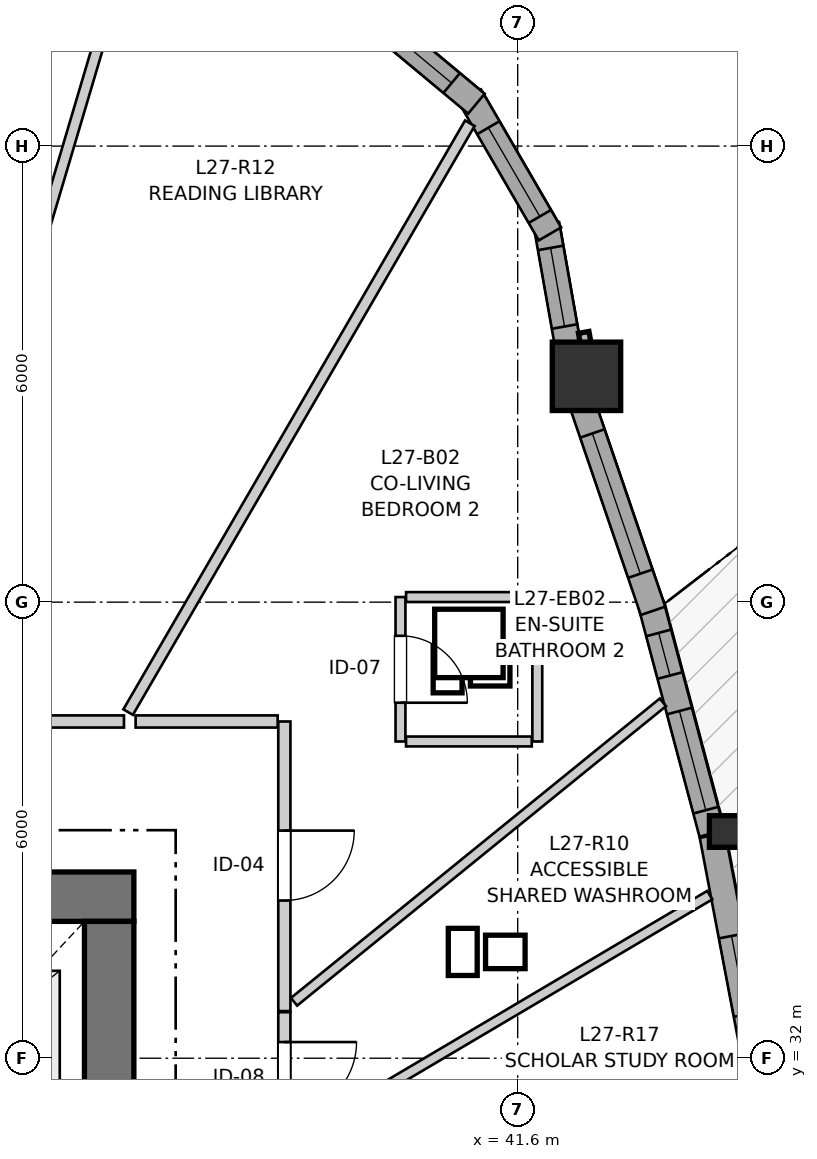
"""IFC4 building model, lengths in metres.
Left out: names, types, materials, properties, quantities, classifications, styles, units other than length and angle.
Written with IfcOpenShell. Run it as: python <this file> out.ifc"""

import sys

from ifc_helpers import new_model, si_unit, direction, frame, frame_2d, origin, origin_2d, place, context, subcontext, project, spatial, rectangle, i_section, extrude, source, transform, mapped, element, fill, save


model = new_model("IFC4")
c1 = context("Model", 3, precision=1e-05, world=origin(), true_north=direction((0.0, 1.0)))
c2 = subcontext(c1, "Body", "Model", "MODEL_VIEW")
j1 = project(units=[si_unit("LENGTHUNIT", "METRE"), si_unit("PLANEANGLEUNIT", "RADIAN")], contexts=[c1])
p1 = place(None, origin())
s1 = spatial("IfcSite", under=j1, at=p1, CompositionType="ELEMENT")
p2 = place(p1, origin())
s2 = spatial("IfcBuilding", under=s1, at=p2, CompositionType="ELEMENT")
p3 = place(p2, frame((0.0, 0.0, 92.8)))
s3 = spatial("IfcBuildingStorey", under=s2, at=p3, CompositionType="ELEMENT", Elevation=92.8)
p4 = place(p3, frame((36.55, 34.125, 0.0), z_axis=(0.0, 0.0, 1.0), x_axis=(-1.0, 0.0, 0.0)))
e1 = element("IfcWall", 1, at=p4, inside=s3, PredefinedType="SHEAR", context=c2, shape_type="SweptSolid", body=[
    extrude(rectangle(XDim=12.4, YDim=0.65, at=frame_2d((6.2, 0.0))), origin(), (0.0, 0.0, 1.0), 2.95),
])
p5 = place(p3, frame((36.225, 18.2, 0.0), z_axis=(0.0, 0.0, 1.0), x_axis=(0.0, 1.0, 0.0)))
e2 = element("IfcWall", 2, at=p5, inside=s3, PredefinedType="SHEAR", context=c2, shape_type="SweptSolid", body=[
    extrude(rectangle(XDim=15.6, YDim=0.65, at=frame_2d((7.8, 0.0))), origin(), (0.0, 0.0, 1.0), 2.95),
])
p6 = place(p5, frame((4.25, 0.0, 0.0)))
e3 = element("IfcOpeningElement", 3, at=p6, cuts=e2, PredefinedType="OPENING", context=c2, shape_type="SweptSolid", body=[
    extrude(rectangle(XDim=1.1, YDim=2.15, at=frame_2d((0.55, 1.075))), frame((0.0, 0.335, 0.0), z_axis=(0.0, -1.0, 0.0), x_axis=(1.0, 0.0, 0.0)), (0.0, 0.0, 1.0), 0.67),
])
p7 = place(p5, frame((10.25, 0.0, 0.0)))
e4 = element("IfcOpeningElement", 4, at=p7, cuts=e2, PredefinedType="OPENING", context=c2, shape_type="SweptSolid", body=[
    extrude(rectangle(XDim=1.1, YDim=2.15, at=frame_2d((0.55, 1.075))), frame((0.0, 0.335, 0.0), z_axis=(0.0, -1.0, 0.0), x_axis=(1.0, 0.0, 0.0)), (0.0, 0.0, 1.0), 0.67),
])
m1 = source(origin(), c2, "Body", "SweptSolid", [
    extrude(i_section(OverallWidth=0.406, OverallDepth=0.416, WebThickness=0.027, FlangeThickness=0.044, FilletRadius=0.015, at=origin_2d()), origin(), (0.0, 0.0, 1.0), 2.95),
])
p8 = place(p3, frame((44.325, 34.983, 0.0), z_axis=(0.0, 0.0, 1.0), x_axis=(1.0, 0.0, 0.0)))
e5 = element("IfcColumn", 5, at=p8, inside=s3, PredefinedType="PILASTER", context=c2, shape_type="MappedRepresentation", body=[
    mapped(m1, transform((0.0, 0.0, 0.0), x_axis=(1.0, 0.0, 0.0), y_axis=(0.0, 1.0, 0.0), z_axis=(0.0, 0.0, 1.0), scale=1.0)),
])
m2 = source(origin(), c2, "Body", "SweptSolid", [
    extrude(rectangle(XDim=0.9, YDim=0.9, at=origin_2d()), origin(), (0.0, 0.0, 1.0), 2.95),
])
p9 = place(p3, frame((42.505, 40.971, 0.0), z_axis=(0.0, 0.0, 1.0), x_axis=(1.0, 0.0, 0.0)))
e6 = element("IfcColumn", 6, at=p9, inside=s3, PredefinedType="COLUMN", context=c2, shape_type="MappedRepresentation", body=[
    mapped(m2, transform((0.0, 0.0, 0.0), x_axis=(1.0, 0.0, 0.0), y_axis=(0.0, 1.0, 0.0), z_axis=(0.0, 0.0, 1.0), scale=1.0)),
])
p10 = place(p3, frame((44.735, 31.919, 0.0), z_axis=(0.0, 0.0, 1.0), x_axis=(-0.186735196273, 0.982410284185, 0.0)))
e7 = element("IfcWall", 7, at=p10, inside=s3, PredefinedType="SOLIDWALL", context=c2, shape_type="SweptSolid", body=[
    extrude(rectangle(XDim=3.066, YDim=0.34, at=frame_2d((1.533, 0.0))), origin(), (0.0, 0.0, 1.0), 2.48),
])
p11 = place(p10, frame((0.669, 0.0, 0.82)))
e8 = element("IfcOpeningElement", 8, at=p11, cuts=e7, PredefinedType="OPENING", context=c2, shape_type="SweptSolid", body=[
    extrude(rectangle(XDim=1.05, YDim=1.45, at=frame_2d((0.525, 0.725))), frame((0.0, 0.18, 0.0), z_axis=(0.0, -1.0, 0.0), x_axis=(1.0, 0.0, 0.0)), (0.0, 0.0, 1.0), 0.36),
])
p12 = place(p3, frame((44.156, 34.958, 0.0), z_axis=(0.0, 0.0, 1.0), x_axis=(-0.257033600382, 0.966402467026, 0.0)))
e9 = element("IfcWall", 9, at=p12, inside=s3, PredefinedType="SOLIDWALL", context=c2, shape_type="SweptSolid", body=[
    extrude(rectangle(XDim=3.116, YDim=0.34, at=frame_2d((1.558, 0.0))), origin(), (0.0, 0.0, 1.0), 2.48),
])
p13 = place(p12, frame((0.315, 0.0, 0.82)))
e10 = element("IfcOpeningElement", 10, at=p13, cuts=e9, PredefinedType="OPENING", context=c2, shape_type="SweptSolid", body=[
    extrude(rectangle(XDim=1.35, YDim=1.45, at=frame_2d((0.675, 0.725))), frame((0.0, 0.18, 0.0), z_axis=(0.0, -1.0, 0.0), x_axis=(1.0, 0.0, 0.0)), (0.0, 0.0, 1.0), 0.36),
])
p14 = place(p12, frame((2.148, 0.0, 0.82)))
e11 = element("IfcOpeningElement", 11, at=p14, cuts=e9, PredefinedType="OPENING", context=c2, shape_type="SweptSolid", body=[
    extrude(rectangle(XDim=0.58, YDim=1.35, at=frame_2d((0.29, 0.675))), frame((0.0, 0.18, 0.0), z_axis=(0.0, -1.0, 0.0), x_axis=(1.0, 0.0, 0.0)), (0.0, 0.0, 1.0), 0.36),
])
p15 = place(p3, frame((43.38, 37.886, 0.0), z_axis=(0.0, 0.0, 1.0), x_axis=(-0.323536742898, 0.946215607562, 0.0)))
e12 = element("IfcWall", 12, at=p15, inside=s3, PredefinedType="SOLIDWALL", context=c2, shape_type="SweptSolid", body=[
    extrude(rectangle(XDim=2.972, YDim=0.34, at=frame_2d((1.486, 0.0))), origin(), (0.0, 0.0, 1.0), 2.48),
])
p16 = place(p15, frame((0.516, 0.0, 0.82)))
e13 = element("IfcOpeningElement", 13, at=p16, cuts=e12, PredefinedType="OPENING", context=c2, shape_type="SweptSolid", body=[
    extrude(rectangle(XDim=1.95, YDim=1.4, at=frame_2d((0.975, 0.7))), frame((0.0, 0.18, 0.0), z_axis=(0.0, -1.0, 0.0), x_axis=(1.0, 0.0, 0.0)), (0.0, 0.0, 1.0), 0.36),
])
p17 = place(p3, frame((42.298, 41.168, 0.0), z_axis=(0.0, 0.0, 1.0), x_axis=(-0.17440141227, 0.984674640375, 0.0)))
e14 = element("IfcWall", 14, at=p17, inside=s3, PredefinedType="SOLIDWALL", context=c2, shape_type="SweptSolid", body=[
    extrude(rectangle(XDim=1.831, YDim=0.34, at=frame_2d((0.916, 0.0))), origin(), (0.0, 0.0, 1.0), 2.48),
])
p18 = place(p17, frame((0.466, 0.0, 0.82)))
e15 = element("IfcOpeningElement", 15, at=p18, cuts=e14, PredefinedType="OPENING", context=c2, shape_type="SweptSolid", body=[
    extrude(rectangle(XDim=1.05, YDim=1.45, at=frame_2d((0.525, 0.725))), frame((0.0, 0.18, 0.0), z_axis=(0.0, -1.0, 0.0), x_axis=(1.0, 0.0, 0.0)), (0.0, 0.0, 1.0), 0.36),
])
p19 = place(p3, frame((42.024, 42.845, 0.0), z_axis=(0.0, 0.0, 1.0), x_axis=(-0.501902596059, 0.864924149315, 0.0)))
e16 = element("IfcWall", 16, at=p19, inside=s3, PredefinedType="SOLIDWALL", context=c2, shape_type="SweptSolid", body=[
    extrude(rectangle(XDim=2.099, YDim=0.34, at=frame_2d((1.049, 0.0))), origin(), (0.0, 0.0, 1.0), 2.48),
])
p20 = place(p19, frame((0.265, 0.0, 0.82)))
e17 = element("IfcOpeningElement", 17, at=p20, cuts=e16, PredefinedType="OPENING", context=c2, shape_type="SweptSolid", body=[
    extrude(rectangle(XDim=1.35, YDim=1.45, at=frame_2d((0.675, 0.725))), frame((0.0, 0.18, 0.0), z_axis=(0.0, -1.0, 0.0), x_axis=(1.0, 0.0, 0.0)), (0.0, 0.0, 1.0), 0.36),
])
p21 = place(p3, frame((41.057, 44.558, 0.0), z_axis=(0.0, 0.0, 1.0), x_axis=(-0.768497696041, 0.639852554249, 0.0)))
e18 = element("IfcWall", 18, at=p21, inside=s3, PredefinedType="SOLIDWALL", context=c2, shape_type="SweptSolid", body=[
    extrude(rectangle(XDim=2.099, YDim=0.34, at=frame_2d((1.049, 0.0))), origin(), (0.0, 0.0, 1.0), 2.48),
])
p22 = place(p21, frame((0.425, 0.0, 0.82)))
e19 = element("IfcOpeningElement", 19, at=p22, cuts=e18, PredefinedType="OPENING", context=c2, shape_type="SweptSolid", body=[
    extrude(rectangle(XDim=1.25, YDim=1.35, at=frame_2d((0.625, 0.675))), frame((0.0, 0.18, 0.0), z_axis=(0.0, -1.0, 0.0), x_axis=(1.0, 0.0, 0.0)), (0.0, 0.0, 1.0), 0.36),
])
p23 = place(p3, frame((38.53, 36.43, 0.0), z_axis=(0.0, 0.0, 1.0), x_axis=(0.0, -1.0, 0.0)))
e20 = element("IfcWall", 20, at=p23, inside=s3, PredefinedType="PARTITIONING", context=c2, shape_type="SweptSolid", body=[
    extrude(rectangle(XDim=3.81, YDim=0.16, at=frame_2d((1.905, 0.0))), origin(), (0.0, 0.0, 1.0), 2.588),
])
p24 = place(p23, frame((1.436, 0.0, 0.0)))
e21 = element("IfcOpeningElement", 21, at=p24, cuts=e20, PredefinedType="OPENING", context=c2, shape_type="SweptSolid", body=[
    extrude(rectangle(XDim=0.92, YDim=2.1, at=frame_2d((0.46, 1.05))), frame((0.0, 0.09, 0.0), z_axis=(0.0, -1.0, 0.0), x_axis=(1.0, 0.0, 0.0)), (0.0, 0.0, 1.0), 0.18),
])
p25 = place(p3, frame((33.428, 36.43, 0.0), z_axis=(0.0, 0.0, 1.0), x_axis=(1.0, 0.0, 0.0)))
e22 = element("IfcWall", 22, at=p25, inside=s3, PredefinedType="PARTITIONING", context=c2, shape_type="SweptSolid", body=[
    extrude(rectangle(XDim=2.992, YDim=0.16, at=frame_2d((1.496, 0.0))), origin(), (0.0, 0.0, 1.0), 2.95),
])
p26 = place(p25, frame((1.015, 0.0, 0.0)))
e23 = element("IfcOpeningElement", 23, at=p26, cuts=e22, PredefinedType="OPENING", context=c2, shape_type="SweptSolid", body=[
    extrude(rectangle(XDim=0.96, YDim=2.1, at=frame_2d((0.48, 1.05))), frame((0.0, 0.09, 0.0), z_axis=(0.0, -1.0, 0.0), x_axis=(1.0, 0.0, 0.0)), (0.0, 0.0, 1.0), 0.18),
])
p27 = place(p3, frame((40.058, 38.067, 0.0), z_axis=(0.0, 0.0, 1.0), x_axis=(0.0, -1.0, 0.0)))
e24 = element("IfcWall", 24, at=p27, inside=s3, PredefinedType="PARTITIONING", context=c2, shape_type="SweptSolid", body=[
    extrude(rectangle(XDim=1.9, YDim=0.13, at=frame_2d((0.95, 0.0))), origin(), (0.0, 0.0, 1.0), 2.95),
])
p28 = place(p27, frame((0.51, 0.0, 0.0)))
e25 = element("IfcOpeningElement", 25, at=p28, cuts=e24, PredefinedType="OPENING", context=c2, shape_type="SweptSolid", body=[
    extrude(rectangle(XDim=0.88, YDim=2.05, at=frame_2d((0.44, 1.025))), frame((0.0, 0.075, 0.0), z_axis=(0.0, -1.0, 0.0), x_axis=(1.0, 0.0, 0.0)), (0.0, 0.0, 1.0), 0.15),
])
p29 = place(p3, frame((38.53, 32.605, 0.0), z_axis=(0.0, 0.0, 1.0), x_axis=(0.0, -1.0, 0.0)))
e26 = element("IfcWall", 26, at=p29, inside=s3, PredefinedType="PARTITIONING", context=c2, shape_type="SweptSolid", body=[
    extrude(rectangle(XDim=1.786, YDim=0.16, at=frame_2d((0.893, 0.0))), origin(), (0.0, 0.0, 1.0), 2.95),
])
p30 = place(p29, frame((0.393, 0.0, 0.0)))
e27 = element("IfcOpeningElement", 27, at=p30, cuts=e26, PredefinedType="OPENING", context=c2, shape_type="SweptSolid", body=[
    extrude(rectangle(XDim=0.95, YDim=2.1, at=frame_2d((0.475, 1.05))), frame((0.0, 0.09, 0.0), z_axis=(0.0, -1.0, 0.0), x_axis=(1.0, 0.0, 0.0)), (0.0, 0.0, 1.0), 0.18),
])
p31 = place(p3, frame((36.475, 36.553, 0.0), z_axis=(0.0, 0.0, 1.0), x_axis=(0.501895508122, 0.864928262301, 0.0)))
e28 = element("IfcWall", 28, at=p31, inside=s3, PredefinedType="PARTITIONING", context=c2, shape_type="SweptSolid", body=[
    extrude(rectangle(XDim=8.958, YDim=0.145, at=frame_2d((4.479, 0.0))), origin(), (0.0, 0.0, 1.0), 2.95),
])
p32 = place(p3, frame((38.65, 30.907, 0.0), z_axis=(0.0, 0.0, 1.0), x_axis=(0.860799697267, 0.508943888052, 0.0)))
e29 = element("IfcWall", 29, at=p32, inside=s3, PredefinedType="PARTITIONING", context=c2, shape_type="SweptSolid", body=[
    extrude(rectangle(XDim=6.363, YDim=0.13, at=frame_2d((3.181, 0.0))), origin(), (0.0, 0.0, 1.0), 2.95),
])
p33 = place(p3, frame((38.657, 32.742, 0.0), z_axis=(0.0, 0.0, 1.0), x_axis=(0.776413778101, 0.630223488276, 0.0)))
e30 = element("IfcWall", 30, at=p33, inside=s3, PredefinedType="PARTITIONING", context=c2, shape_type="SweptSolid", body=[
    extrude(rectangle(XDim=6.251, YDim=0.13, at=frame_2d((3.125, 0.0))), origin(), (0.0, 0.0, 1.0), 2.95),
])
p34 = place(p3, frame((34.859, 41.201, 0.0), z_axis=(0.0, 0.0, 1.0), x_axis=(0.284335435967, 0.958724861393, 0.0)))
e31 = element("IfcWall", 31, at=p34, inside=s3, PredefinedType="PARTITIONING", context=c2, shape_type="SweptSolid", body=[
    extrude(rectangle(XDim=5.348, YDim=0.145, at=frame_2d((2.674, 0.0))), origin(), (0.0, 0.0, 1.0), 2.95),
])
p35 = place(p3, frame((36.573, 36.43, 0.0), z_axis=(0.0, 0.0, 1.0), x_axis=(1.0, 0.0, 0.0)))
e32 = element("IfcWall", 32, at=p35, inside=s3, PredefinedType="PARTITIONING", context=c2, shape_type="SweptSolid", body=[
    extrude(rectangle(XDim=1.869, YDim=0.16, at=frame_2d((0.934, 0.0))), origin(), (0.0, 0.0, 1.0), 2.588),
])
p36 = place(p3, frame((41.858, 36.167, 0.0), z_axis=(0.0, 0.0, 1.0), x_axis=(0.0, 1.0, 0.0)))
e33 = element("IfcWall", 33, at=p36, inside=s3, PredefinedType="PARTITIONING", context=c2, shape_type="SweptSolid", body=[
    extrude(rectangle(XDim=1.9, YDim=0.13, at=frame_2d((0.95, 0.0))), origin(), (0.0, 0.0, 1.0), 2.95),
])
for number, where, z_axis, x_axis in (
    (34, (40.131, 38.067, 0.0), (0.0, 0.0, 1.0), (1.0, 0.0, 0.0)),
    (35, (40.131, 36.167, 0.0), (0.0, 0.0, 1.0), (1.0, 0.0, 0.0)),
):
    element("IfcWall", number, at=place(p3, frame(where, z_axis=z_axis, x_axis=x_axis)), inside=s3, PredefinedType="PARTITIONING", context=c2, shape_type="SweptSolid", body=[
        extrude(rectangle(XDim=1.654, YDim=0.13, at=frame_2d((0.827, 0.0))), origin(), (0.0, 0.0, 1.0), 2.95),
    ])
m3 = source(origin(), c2, "Body", "SweptSolid", [
    extrude(rectangle(XDim=1.05, YDim=1.45, at=frame_2d((0.525, 0.725))), frame((0.0, 0.03, 0.0), z_axis=(0.0, -1.0, 0.0), x_axis=(1.0, 0.0, 0.0)), (0.0, 0.0, 1.0), 0.06),
])
p37 = place(p11, origin())
e36 = element("IfcWindow", 36, at=p37, inside=s3, PartitioningType="SINGLE_PANEL", PredefinedType="WINDOW", context=c2, shape_type="MappedRepresentation", body=[
    mapped(m3, transform((0.0, 0.0, 0.0), x_axis=(1.0, 0.0, 0.0), y_axis=(0.0, 1.0, 0.0), z_axis=(0.0, 0.0, 1.0), scale=1.0)),
])
fill(e8, e36)
m4 = source(origin(), c2, "Body", "SweptSolid", [
    extrude(rectangle(XDim=1.35, YDim=1.45, at=frame_2d((0.675, 0.725))), frame((0.0, 0.03, 0.0), z_axis=(0.0, -1.0, 0.0), x_axis=(1.0, 0.0, 0.0)), (0.0, 0.0, 1.0), 0.06),
])
p38 = place(p13, origin())
e37 = element("IfcWindow", 37, at=p38, inside=s3, PartitioningType="SINGLE_PANEL", PredefinedType="WINDOW", context=c2, shape_type="MappedRepresentation", body=[
    mapped(m4, transform((0.0, 0.0, 0.0), x_axis=(1.0, 0.0, 0.0), y_axis=(0.0, 1.0, 0.0), z_axis=(0.0, 0.0, 1.0), scale=1.0)),
])
fill(e10, e37)
m5 = source(origin(), c2, "Body", "SweptSolid", [
    extrude(rectangle(XDim=0.58, YDim=1.35, at=frame_2d((0.29, 0.675))), frame((0.0, 0.03, 0.0), z_axis=(0.0, -1.0, 0.0), x_axis=(1.0, 0.0, 0.0)), (0.0, 0.0, 1.0), 0.06),
])
p39 = place(p14, origin())
e38 = element("IfcWindow", 38, at=p39, inside=s3, PartitioningType="SINGLE_PANEL", PredefinedType="WINDOW", context=c2, shape_type="MappedRepresentation", body=[
    mapped(m5, transform((0.0, 0.0, 0.0), x_axis=(1.0, 0.0, 0.0), y_axis=(0.0, 1.0, 0.0), z_axis=(0.0, 0.0, 1.0), scale=1.0)),
])
fill(e11, e38)
m6 = source(origin(), c2, "Body", "SweptSolid", [
    extrude(rectangle(XDim=1.95, YDim=1.4, at=frame_2d((0.975, 0.7))), frame((0.0, 0.03, 0.0), z_axis=(0.0, -1.0, 0.0), x_axis=(1.0, 0.0, 0.0)), (0.0, 0.0, 1.0), 0.06),
])
p40 = place(p16, origin())
e39 = element("IfcWindow", 39, at=p40, inside=s3, PartitioningType="SINGLE_PANEL", PredefinedType="WINDOW", context=c2, shape_type="MappedRepresentation", body=[
    mapped(m6, transform((0.0, 0.0, 0.0), x_axis=(1.0, 0.0, 0.0), y_axis=(0.0, 1.0, 0.0), z_axis=(0.0, 0.0, 1.0), scale=1.0)),
])
fill(e13, e39)
p41 = place(p18, origin())
e40 = element("IfcWindow", 40, at=p41, inside=s3, PartitioningType="SINGLE_PANEL", PredefinedType="WINDOW", context=c2, shape_type="MappedRepresentation", body=[
    mapped(m3, transform((0.0, 0.0, 0.0), x_axis=(1.0, 0.0, 0.0), y_axis=(0.0, 1.0, 0.0), z_axis=(0.0, 0.0, 1.0), scale=1.0)),
])
fill(e15, e40)
p42 = place(p20, origin())
e41 = element("IfcWindow", 41, at=p42, inside=s3, PartitioningType="SINGLE_PANEL", PredefinedType="WINDOW", context=c2, shape_type="MappedRepresentation", body=[
    mapped(m4, transform((0.0, 0.0, 0.0), x_axis=(1.0, 0.0, 0.0), y_axis=(0.0, 1.0, 0.0), z_axis=(0.0, 0.0, 1.0), scale=1.0)),
])
fill(e17, e41)
m7 = source(origin(), c2, "Body", "SweptSolid", [
    extrude(rectangle(XDim=1.25, YDim=1.35, at=frame_2d((0.625, 0.675))), frame((0.0, 0.03, 0.0), z_axis=(0.0, -1.0, 0.0), x_axis=(1.0, 0.0, 0.0)), (0.0, 0.0, 1.0), 0.06),
])
p43 = place(p22, origin())
e42 = element("IfcWindow", 42, at=p43, inside=s3, PartitioningType="SINGLE_PANEL", PredefinedType="WINDOW", context=c2, shape_type="MappedRepresentation", body=[
    mapped(m7, transform((0.0, 0.0, 0.0), x_axis=(1.0, 0.0, 0.0), y_axis=(0.0, 1.0, 0.0), z_axis=(0.0, 0.0, 1.0), scale=1.0)),
])
fill(e19, e42)
m8 = source(origin(), c2, "Body", "SweptSolid", [
    extrude(rectangle(XDim=0.92, YDim=2.1, at=frame_2d((0.46, 1.05))), frame((0.0, 0.025, 0.0), z_axis=(0.0, -1.0, 0.0), x_axis=(1.0, 0.0, 0.0)), (0.0, 0.0, 1.0), 0.05),
])
p44 = place(p24, origin())
e43 = element("IfcDoor", 43, at=p44, inside=s3, OperationType="SINGLE_SWING_LEFT", PredefinedType="DOOR", context=c2, shape_type="MappedRepresentation", body=[
    mapped(m8, transform((0.0, 0.0, 0.0), x_axis=(1.0, 0.0, 0.0), y_axis=(0.0, 1.0, 0.0), z_axis=(0.0, 0.0, 1.0), scale=1.0)),
])
fill(e21, e43)
m9 = source(origin(), c2, "Body", "SweptSolid", [
    extrude(rectangle(XDim=0.88, YDim=2.05, at=frame_2d((0.44, 1.025))), frame((0.0, 0.025, 0.0), z_axis=(0.0, -1.0, 0.0), x_axis=(1.0, 0.0, 0.0)), (0.0, 0.0, 1.0), 0.05),
])
p45 = place(p28, origin())
e44 = element("IfcDoor", 44, at=p45, inside=s3, OperationType="SINGLE_SWING_RIGHT", PredefinedType="DOOR", context=c2, shape_type="MappedRepresentation", body=[
    mapped(m9, transform((0.0, 0.0, 0.0), x_axis=(1.0, 0.0, 0.0), y_axis=(0.0, 1.0, 0.0), z_axis=(0.0, 0.0, 1.0), scale=1.0)),
])
fill(e25, e44)
m10 = source(origin(), c2, "Body", "SweptSolid", [
    extrude(rectangle(XDim=0.95, YDim=2.1, at=frame_2d((0.475, 1.05))), frame((0.0, 0.025, 0.0), z_axis=(0.0, -1.0, 0.0), x_axis=(1.0, 0.0, 0.0)), (0.0, 0.0, 1.0), 0.05),
])
p46 = place(p30, origin())
e45 = element("IfcDoor", 45, at=p46, inside=s3, OperationType="SINGLE_SWING_LEFT", PredefinedType="DOOR", context=c2, shape_type="MappedRepresentation", body=[
    mapped(m10, transform((0.0, 0.0, 0.0), x_axis=(1.0, 0.0, 0.0), y_axis=(0.0, 1.0, 0.0), z_axis=(0.0, 0.0, 1.0), scale=1.0)),
])
fill(e27, e45)
save(model, sys.argv[1])
